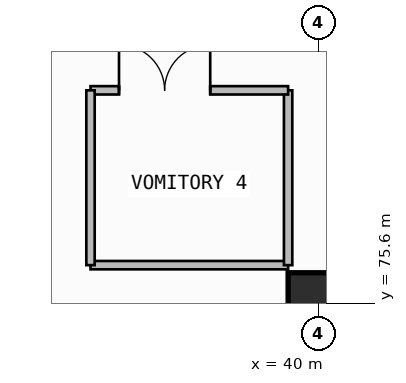
"""IFC4 building model, lengths in metres.
Left out: names, types, materials, properties, quantities, classifications, styles, units other than length and angle.
Written with IfcOpenShell. Run it as: python <this file> out.ifc"""

import sys

from ifc_helpers import new_model, si_unit, direction, frame, frame_2d, origin, origin_2d, place, context, subcontext, project, spatial, rectangle, extrude, element, fill, save


model = new_model("IFC4")
c1 = context("Model", 3, precision=1e-05, world=origin(), true_north=direction((0.0, 1.0)))
c2 = subcontext(c1, "Body", "Model", "MODEL_VIEW")
j1 = project(units=[si_unit("LENGTHUNIT", "METRE"), si_unit("PLANEANGLEUNIT", "RADIAN")], contexts=[c1])
p1 = place(None, origin())
s1 = spatial("IfcSite", under=j1, at=p1, CompositionType="ELEMENT")
p2 = place(p1, origin())
s2 = spatial("IfcBuilding", under=s1, at=p2, CompositionType="ELEMENT")
p3 = place(p2, frame((0.0, 0.0, 13.2)))
s3 = spatial("IfcBuildingStorey", under=s2, at=p3, CompositionType="ELEMENT", Elevation=13.2)
p4 = place(p3, frame((40.0, 75.6, 0.0), z_axis=(0.0, 0.0, 1.0), x_axis=(1.0, 0.0, 0.0)))
e1 = element("IfcColumn", 1, at=p4, inside=s3, PredefinedType="COLUMN", context=c2, shape_type="SweptSolid", body=[
    extrude(rectangle(XDim=1.6, YDim=1.6, at=origin_2d()), origin(), (0.0, 0.0, 1.0), 4.2),
])
p5 = place(p3, frame((34.0, 76.6, 0.0), z_axis=(0.0, 0.0, 1.0), x_axis=(1.0, 0.0, 0.0)))
e2 = element("IfcWall", 2, at=p5, inside=s3, PredefinedType="SOLIDWALL", context=c2, shape_type="SweptSolid", body=[
    extrude(rectangle(XDim=5.2, YDim=0.22, at=frame_2d((2.6, 0.0))), origin(), (0.0, 0.0, 1.0), 3.88),
])
p6 = place(p3, frame((39.2, 76.6, 0.0), z_axis=(0.0, 0.0, 1.0), x_axis=(0.0, 1.0, 0.0)))
e3 = element("IfcWall", 3, at=p6, inside=s3, PredefinedType="SOLIDWALL", context=c2, shape_type="SweptSolid", body=[
    extrude(rectangle(XDim=4.6, YDim=0.22, at=frame_2d((2.3, 0.0))), origin(), (0.0, 0.0, 1.0), 3.88),
])
p7 = place(p3, frame((39.2, 81.2, 0.0), z_axis=(0.0, 0.0, 1.0), x_axis=(-1.0, 0.0, 0.0)))
e4 = element("IfcWall", 4, at=p7, inside=s3, PredefinedType="SOLIDWALL", context=c2, shape_type="SweptSolid", body=[
    extrude(rectangle(XDim=5.2, YDim=0.22, at=frame_2d((2.6, 0.0))), origin(), (0.0, 0.0, 1.0), 3.88),
])
p8 = place(p7, frame((2.05, 0.0, 0.0)))
e5 = element("IfcOpeningElement", 5, at=p8, cuts=e4, PredefinedType="OPENING", context=c2, shape_type="SweptSolid", body=[
    extrude(rectangle(XDim=2.4, YDim=2.4, at=frame_2d((1.2, 1.2))), frame((0.0, 0.12, 0.0), z_axis=(0.0, -1.0, 0.0), x_axis=(1.0, 0.0, 0.0)), (0.0, 0.0, 1.0), 0.24),
])
p9 = place(p3, frame((34.0, 81.2, 0.0), z_axis=(0.0, 0.0, 1.0), x_axis=(0.0, -1.0, 0.0)))
e6 = element("IfcWall", 6, at=p9, inside=s3, PredefinedType="SOLIDWALL", context=c2, shape_type="SweptSolid", body=[
    extrude(rectangle(XDim=4.6, YDim=0.22, at=frame_2d((2.3, 0.0))), origin(), (0.0, 0.0, 1.0), 3.88),
])
p10 = place(p8, frame((2.4, 0.0, 0.0), z_axis=(0.0, 0.0, 1.0), x_axis=(-1.0, 0.0, 0.0)))
e7 = element("IfcDoor", 7, at=p10, inside=s3, OperationType="DOUBLE_DOOR_SINGLE_SWING", PredefinedType="USERDEFINED", context=c2, shape_type="SweptSolid", body=[
    extrude(rectangle(XDim=2.4, YDim=2.4, at=frame_2d((1.2, 1.2))), frame((0.0, 0.025, 0.0), z_axis=(0.0, -1.0, 0.0), x_axis=(1.0, 0.0, 0.0)), (0.0, 0.0, 1.0), 0.05),
])
fill(e5, e7)
save(model, sys.argv[1])
